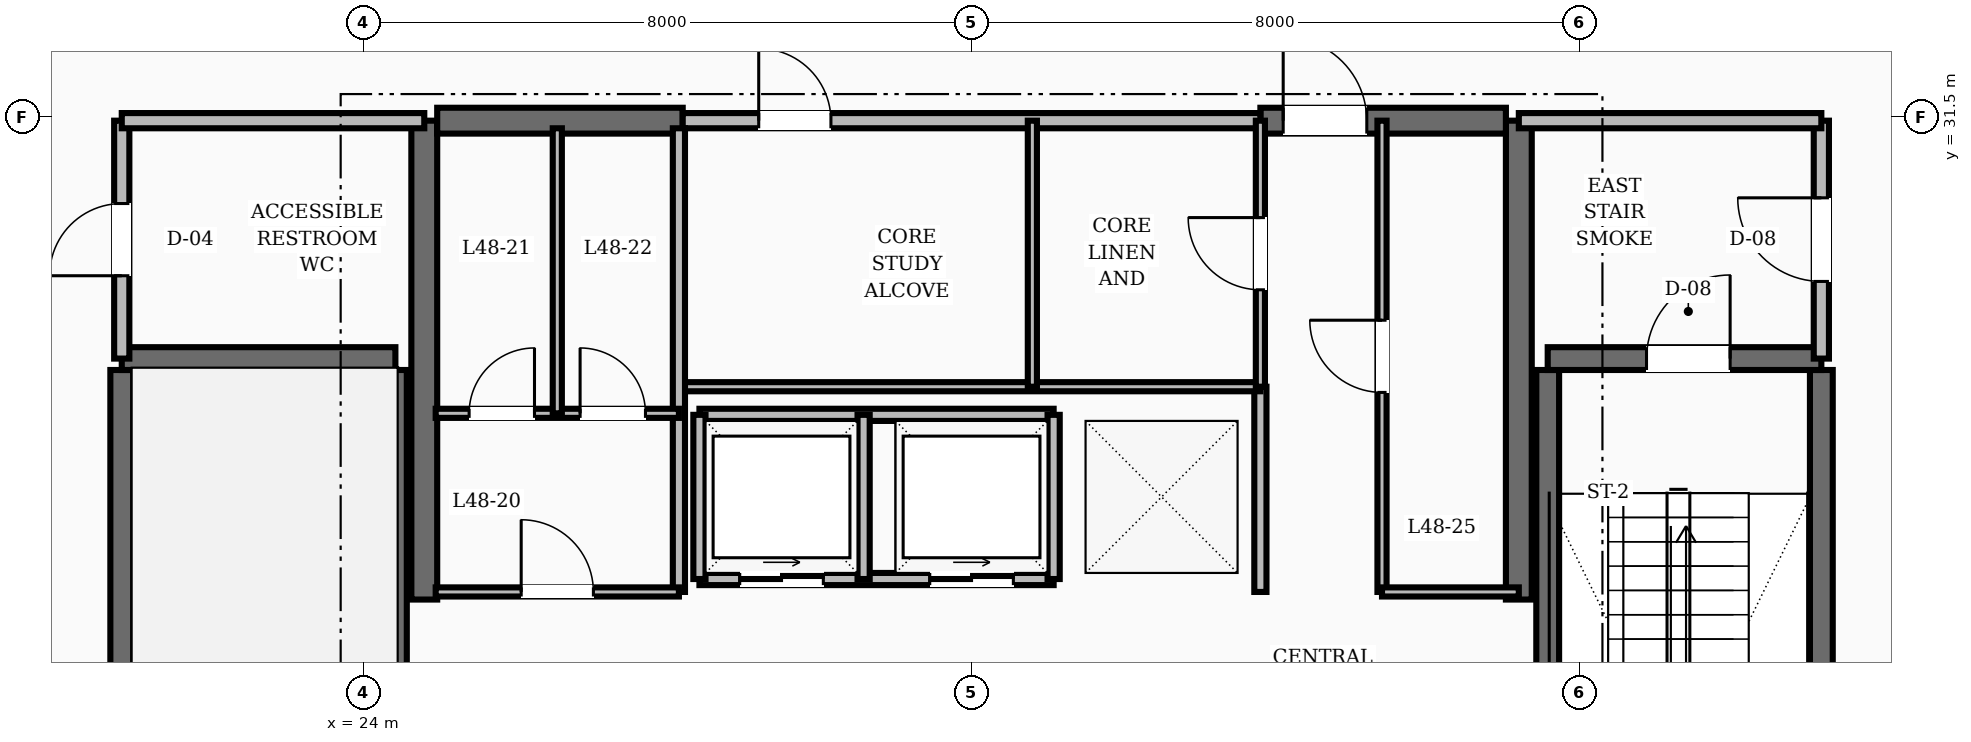
"""IFC4 building model, lengths in metres.
Left out: names, types, materials, properties, quantities, classifications, styles, units other than length and angle.
Written with IfcOpenShell. Run it as: python <this file> out.ifc"""

import sys

from ifc_helpers import new_model, si_unit, direction, frame, frame_2d, origin, place, context, subcontext, project, spatial, rectangle, extrude, element, fill, save


model = new_model("IFC4")
c1 = context("Model", 3, precision=1e-05, world=origin(), true_north=direction((0.0, 1.0)))
c2 = subcontext(c1, "Body", "Model", "MODEL_VIEW")
j1 = project(units=[si_unit("LENGTHUNIT", "METRE"), si_unit("PLANEANGLEUNIT", "RADIAN")], contexts=[c1])
p1 = place(None, origin())
s1 = spatial("IfcSite", under=j1, at=p1, CompositionType="ELEMENT")
p2 = place(p1, origin())
s2 = spatial("IfcBuilding", under=s1, at=p2, CompositionType="ELEMENT")
p3 = place(p2, frame((0.0, 0.0, 185.6)))
s3 = spatial("IfcBuildingStorey", under=s2, at=p3, CompositionType="ELEMENT", Elevation=185.6)
for number, where, z_axis, x_axis in (
    (1, (24.8, 25.15, 0.0), (0.0, 0.0, 1.0), (0.0, 1.0, 0.0)),
    (2, (39.2, 25.15, 0.0), (0.0, 0.0, 1.0), (0.0, 1.0, 0.0)),
):
    element("IfcWall", number, at=place(p3, frame(where, z_axis=z_axis, x_axis=x_axis)), inside=s3, PredefinedType="SHEAR", context=c2, shape_type="SweptSolid", body=[
        extrude(rectangle(XDim=6.3, YDim=0.34, at=frame_2d((3.15, 0.0))), origin(), (0.0, 0.0, 1.0), 3.6),
    ])
p4 = place(p3, frame((24.97, 31.45, 0.0), z_axis=(0.0, 0.0, 1.0), x_axis=(1.0, 0.0, 0.0)))
e3 = element("IfcWall", 3, at=p4, inside=s3, PredefinedType="SHEAR", context=c2, shape_type="SweptSolid", body=[
    extrude(rectangle(XDim=3.23, YDim=0.34, at=frame_2d((1.615, 0.0))), origin(), (0.0, 0.0, 1.0), 3.6),
])
p5 = place(p3, frame((35.8, 31.45, 0.0), z_axis=(0.0, 0.0, 1.0), x_axis=(1.0, 0.0, 0.0)))
e4 = element("IfcWall", 4, at=p5, inside=s3, PredefinedType="SHEAR", context=c2, shape_type="SweptSolid", body=[
    extrude(rectangle(XDim=3.23, YDim=0.34, at=frame_2d((1.615, 0.0))), origin(), (0.0, 0.0, 1.0), 3.6),
])
p6 = place(p5, frame((0.3, 0.0, 0.0)))
e5 = element("IfcOpeningElement", 5, at=p6, cuts=e4, PredefinedType="OPENING", context=c2, shape_type="SweptSolid", body=[
    extrude(rectangle(XDim=1.1, YDim=2.1, at=frame_2d((0.55, 1.05))), frame((0.0, 0.18, 0.0), z_axis=(0.0, -1.0, 0.0), x_axis=(1.0, 0.0, 0.0)), (0.0, 0.0, 1.0), 0.36),
])
for number, where, z_axis, x_axis in (
    (6, (20.82, 19.43, 0.0), (0.0, 0.0, 1.0), (0.0, 1.0, 0.0)),
    (7, (24.42, 19.43, 0.0), (0.0, 0.0, 1.0), (0.0, 1.0, 0.0)),
):
    element("IfcWall", number, at=place(p3, frame(where, z_axis=z_axis, x_axis=x_axis)), inside=s3, PredefinedType="SHEAR", context=c2, shape_type="SweptSolid", body=[
        extrude(rectangle(XDim=8.74, YDim=0.3, at=frame_2d((4.37, 0.0))), origin(), (0.0, 0.0, 1.0), 3.6),
    ])
p7 = place(p3, frame((20.82, 28.32, 0.0), z_axis=(0.0, 0.0, 1.0), x_axis=(1.0, 0.0, 0.0)))
e8 = element("IfcWall", 8, at=p7, inside=s3, PredefinedType="SHEAR", context=c2, shape_type="SweptSolid", body=[
    extrude(rectangle(XDim=3.6, YDim=0.3, at=frame_2d((1.8, 0.0))), origin(), (0.0, 0.0, 1.0), 3.6),
])
for number, where, z_axis, x_axis in (
    (9, (43.18, 19.43, 0.0), (0.0, 0.0, 1.0), (0.0, 1.0, 0.0)),
    (10, (39.58, 19.43, 0.0), (0.0, 0.0, 1.0), (0.0, 1.0, 0.0)),
):
    element("IfcWall", number, at=place(p3, frame(where, z_axis=z_axis, x_axis=x_axis)), inside=s3, PredefinedType="SHEAR", context=c2, shape_type="SweptSolid", body=[
        extrude(rectangle(XDim=8.74, YDim=0.3, at=frame_2d((4.37, 0.0))), origin(), (0.0, 0.0, 1.0), 3.6),
    ])
p8 = place(p3, frame((39.58, 28.32, 0.0), z_axis=(0.0, 0.0, 1.0), x_axis=(1.0, 0.0, 0.0)))
e11 = element("IfcWall", 11, at=p8, inside=s3, PredefinedType="SHEAR", context=c2, shape_type="SweptSolid", body=[
    extrude(rectangle(XDim=3.6, YDim=0.3, at=frame_2d((1.8, 0.0))), origin(), (0.0, 0.0, 1.0), 3.6),
])
p9 = place(p8, frame((1.3, 0.0, 0.0)))
e12 = element("IfcOpeningElement", 12, at=p9, cuts=e11, PredefinedType="OPENING", context=c2, shape_type="SweptSolid", body=[
    extrude(rectangle(XDim=1.1, YDim=2.1, at=frame_2d((0.55, 1.05))), frame((0.0, 0.16, 0.0), z_axis=(0.0, -1.0, 0.0), x_axis=(1.0, 0.0, 0.0)), (0.0, 0.0, 1.0), 0.32),
])
p10 = place(p3, frame((43.18, 28.32, 0.0), z_axis=(0.0, 0.0, 1.0), x_axis=(0.0, 1.0, 0.0)))
e13 = element("IfcWall", 13, at=p10, inside=s3, PredefinedType="SOLIDWALL", context=c2, shape_type="SweptSolid", body=[
    extrude(rectangle(XDim=3.13, YDim=0.2, at=frame_2d((1.565, 0.0))), origin(), (0.0, 0.0, 1.0), 2.8),
])
p11 = place(p10, frame((1.015, 0.0, 0.0)))
e14 = element("IfcOpeningElement", 14, at=p11, cuts=e13, PredefinedType="OPENING", context=c2, shape_type="SweptSolid", body=[
    extrude(rectangle(XDim=1.1, YDim=2.1, at=frame_2d((0.55, 1.05))), frame((0.0, 0.11, 0.0), z_axis=(0.0, -1.0, 0.0), x_axis=(1.0, 0.0, 0.0)), (0.0, 0.0, 1.0), 0.22),
])
p12 = place(p3, frame((39.2, 31.45, 0.0), z_axis=(0.0, 0.0, 1.0), x_axis=(1.0, 0.0, 0.0)))
e15 = element("IfcWall", 15, at=p12, inside=s3, PredefinedType="SOLIDWALL", context=c2, shape_type="SweptSolid", body=[
    extrude(rectangle(XDim=3.98, YDim=0.2, at=frame_2d((1.99, 0.0))), origin(), (0.0, 0.0, 1.0), 2.8),
])
p13 = place(p3, frame((20.82, 28.32, 0.0), z_axis=(0.0, 0.0, 1.0), x_axis=(0.0, 1.0, 0.0)))
e16 = element("IfcWall", 16, at=p13, inside=s3, PredefinedType="SOLIDWALL", context=c2, shape_type="SweptSolid", body=[
    extrude(rectangle(XDim=3.13, YDim=0.2, at=frame_2d((1.565, 0.0))), origin(), (0.0, 0.0, 1.0), 2.8),
])
p14 = place(p13, frame((1.09, 0.0, 0.0)))
e17 = element("IfcOpeningElement", 17, at=p14, cuts=e16, PredefinedType="OPENING", context=c2, shape_type="SweptSolid", body=[
    extrude(rectangle(XDim=0.95, YDim=2.1, at=frame_2d((0.475, 1.05))), frame((0.0, 0.11, 0.0), z_axis=(0.0, -1.0, 0.0), x_axis=(1.0, 0.0, 0.0)), (0.0, 0.0, 1.0), 0.22),
])
p15 = place(p3, frame((20.82, 31.45, 0.0), z_axis=(0.0, 0.0, 1.0), x_axis=(1.0, 0.0, 0.0)))
e18 = element("IfcWall", 18, at=p15, inside=s3, PredefinedType="SOLIDWALL", context=c2, shape_type="SweptSolid", body=[
    extrude(rectangle(XDim=3.98, YDim=0.2, at=frame_2d((1.99, 0.0))), origin(), (0.0, 0.0, 1.0), 2.8),
])
p16 = place(p3, frame((35.8, 25.25, 0.0), z_axis=(0.0, 0.0, 1.0), x_axis=(0.0, 1.0, 0.0)))
e19 = element("IfcWall", 19, at=p16, inside=s3, PredefinedType="SOLIDWALL", context=c2, shape_type="SweptSolid", body=[
    extrude(rectangle(XDim=2.7, YDim=0.16, at=frame_2d((1.35, 0.0))), origin(), (0.0, 0.0, 1.0), 2.8),
])
p17 = place(p3, frame((28.42, 25.42, 0.0), z_axis=(0.0, 0.0, 1.0), x_axis=(1.0, 0.0, 0.0)))
e20 = element("IfcWall", 20, at=p17, inside=s3, PredefinedType="SOLIDWALL", context=c2, shape_type="SweptSolid", body=[
    extrude(rectangle(XDim=4.66, YDim=0.16, at=frame_2d((2.33, 0.0))), origin(), (0.0, 0.0, 1.0), 2.8),
])
p18 = place(p17, frame((0.53, 0.0, 0.0)))
e21 = element("IfcOpeningElement", 21, at=p18, cuts=e20, PredefinedType="OPENING", context=c2, shape_type="SweptSolid", body=[
    extrude(rectangle(XDim=1.1, YDim=2.15, at=frame_2d((0.55, 1.075))), frame((0.0, 0.09, 0.0), z_axis=(0.0, -1.0, 0.0), x_axis=(1.0, 0.0, 0.0)), (0.0, 0.0, 1.0), 0.18),
])
p19 = place(p17, frame((3.03, 0.0, 0.0)))
e22 = element("IfcOpeningElement", 22, at=p19, cuts=e20, PredefinedType="OPENING", context=c2, shape_type="SweptSolid", body=[
    extrude(rectangle(XDim=1.1, YDim=2.15, at=frame_2d((0.55, 1.075))), frame((0.0, 0.09, 0.0), z_axis=(0.0, -1.0, 0.0), x_axis=(1.0, 0.0, 0.0)), (0.0, 0.0, 1.0), 0.18),
])
p20 = place(p3, frame((28.42, 27.58, 0.0), z_axis=(0.0, 0.0, 1.0), x_axis=(1.0, 0.0, 0.0)))
e23 = element("IfcWall", 23, at=p20, inside=s3, PredefinedType="SOLIDWALL", context=c2, shape_type="SweptSolid", body=[
    extrude(rectangle(XDim=4.66, YDim=0.16, at=frame_2d((2.33, 0.0))), origin(), (0.0, 0.0, 1.0), 2.8),
])
for number, where, z_axis, x_axis in (
    (24, (28.42, 25.42, 0.0), (0.0, 0.0, 1.0), (0.0, 1.0, 0.0)),
    (25, (30.58, 25.42, 0.0), (0.0, 0.0, 1.0), (0.0, 1.0, 0.0)),
    (26, (33.08, 25.42, 0.0), (0.0, 0.0, 1.0), (0.0, 1.0, 0.0)),
):
    element("IfcWall", number, at=place(p3, frame(where, z_axis=z_axis, x_axis=x_axis)), inside=s3, PredefinedType="SOLIDWALL", context=c2, shape_type="SweptSolid", body=[
        extrude(rectangle(XDim=2.16, YDim=0.16, at=frame_2d((1.08, 0.0))), origin(), (0.0, 0.0, 1.0), 2.8),
    ])
p21 = place(p3, frame((28.2, 31.45, 0.0), z_axis=(0.0, 0.0, 1.0), x_axis=(1.0, 0.0, 0.0)))
e27 = element("IfcWall", 27, at=p21, inside=s3, PredefinedType="SOLIDWALL", context=c2, shape_type="SweptSolid", body=[
    extrude(rectangle(XDim=7.6, YDim=0.2, at=frame_2d((3.8, 0.0))), origin(), (0.0, 0.0, 1.0), 2.8),
])
p22 = place(p21, frame((1.0, 0.0, 0.0)))
e28 = element("IfcOpeningElement", 28, at=p22, cuts=e27, PredefinedType="OPENING", context=c2, shape_type="SweptSolid", body=[
    extrude(rectangle(XDim=0.95, YDim=2.1, at=frame_2d((0.475, 1.05))), frame((0.0, 0.11, 0.0), z_axis=(0.0, -1.0, 0.0), x_axis=(1.0, 0.0, 0.0)), (0.0, 0.0, 1.0), 0.22),
])
p23 = place(p3, frame((28.2, 27.95, 0.0), z_axis=(0.0, 0.0, 1.0), x_axis=(1.0, 0.0, 0.0)))
e29 = element("IfcWall", 29, at=p23, inside=s3, PredefinedType="PARTITIONING", context=c2, shape_type="SweptSolid", body=[
    extrude(rectangle(XDim=7.6, YDim=0.12, at=frame_2d((3.8, 0.0))), origin(), (0.0, 0.0, 1.0), 2.8),
])
p24 = place(p3, frame((35.8, 27.95, 0.0), z_axis=(0.0, 0.0, 1.0), x_axis=(0.0, 1.0, 0.0)))
e30 = element("IfcWall", 30, at=p24, inside=s3, PredefinedType="PARTITIONING", context=c2, shape_type="SweptSolid", body=[
    extrude(rectangle(XDim=3.5, YDim=0.12, at=frame_2d((1.75, 0.0))), origin(), (0.0, 0.0, 1.0), 2.8),
])
p25 = place(p24, frame((1.275, 0.0, 0.0)))
e31 = element("IfcOpeningElement", 31, at=p25, cuts=e30, PredefinedType="OPENING", context=c2, shape_type="SweptSolid", body=[
    extrude(rectangle(XDim=0.95, YDim=2.1, at=frame_2d((0.475, 1.05))), frame((0.0, 0.07, 0.0), z_axis=(0.0, -1.0, 0.0), x_axis=(1.0, 0.0, 0.0)), (0.0, 0.0, 1.0), 0.14),
])
p26 = place(p3, frame((32.8, 27.95, 0.0), z_axis=(0.0, 0.0, 1.0), x_axis=(0.0, 1.0, 0.0)))
e32 = element("IfcWall", 32, at=p26, inside=s3, PredefinedType="PARTITIONING", context=c2, shape_type="SweptSolid", body=[
    extrude(rectangle(XDim=3.5, YDim=0.12, at=frame_2d((1.75, 0.0))), origin(), (0.0, 0.0, 1.0), 2.8),
])
p27 = place(p3, frame((28.15, 25.25, 0.0), z_axis=(0.0, 0.0, 1.0), x_axis=(0.0, 1.0, 0.0)))
e33 = element("IfcWall", 33, at=p27, inside=s3, PredefinedType="SOLIDWALL", context=c2, shape_type="SweptSolid", body=[
    extrude(rectangle(XDim=6.1, YDim=0.16, at=frame_2d((3.05, 0.0))), origin(), (0.0, 0.0, 1.0), 2.8),
])
p28 = place(p3, frame((24.95, 25.25, 0.0), z_axis=(0.0, 0.0, 1.0), x_axis=(1.0, 0.0, 0.0)))
e34 = element("IfcWall", 34, at=p28, inside=s3, PredefinedType="PARTITIONING", context=c2, shape_type="SweptSolid", body=[
    extrude(rectangle(XDim=3.2, YDim=0.12, at=frame_2d((1.6, 0.0))), origin(), (0.0, 0.0, 1.0), 2.8),
])
p29 = place(p28, frame((1.125, 0.0, 0.0)))
e35 = element("IfcOpeningElement", 35, at=p29, cuts=e34, PredefinedType="OPENING", context=c2, shape_type="SweptSolid", body=[
    extrude(rectangle(XDim=0.95, YDim=2.1, at=frame_2d((0.475, 1.05))), frame((0.0, 0.07, 0.0), z_axis=(0.0, -1.0, 0.0), x_axis=(1.0, 0.0, 0.0)), (0.0, 0.0, 1.0), 0.14),
])
p30 = place(p3, frame((37.4, 25.25, 0.0), z_axis=(0.0, 0.0, 1.0), x_axis=(0.0, 1.0, 0.0)))
e36 = element("IfcWall", 36, at=p30, inside=s3, PredefinedType="PARTITIONING", context=c2, shape_type="SweptSolid", body=[
    extrude(rectangle(XDim=6.2, YDim=0.12, at=frame_2d((3.1, 0.0))), origin(), (0.0, 0.0, 1.0), 2.8),
])
p31 = place(p30, frame((2.625, 0.0, 0.0)))
e37 = element("IfcOpeningElement", 37, at=p31, cuts=e36, PredefinedType="OPENING", context=c2, shape_type="SweptSolid", body=[
    extrude(rectangle(XDim=0.95, YDim=2.1, at=frame_2d((0.475, 1.05))), frame((0.0, 0.07, 0.0), z_axis=(0.0, -1.0, 0.0), x_axis=(1.0, 0.0, 0.0)), (0.0, 0.0, 1.0), 0.14),
])
p32 = place(p3, frame((37.4, 25.25, 0.0), z_axis=(0.0, 0.0, 1.0), x_axis=(1.0, 0.0, 0.0)))
e38 = element("IfcWall", 38, at=p32, inside=s3, PredefinedType="PARTITIONING", context=c2, shape_type="SweptSolid", body=[
    extrude(rectangle(XDim=1.8, YDim=0.12, at=frame_2d((0.9, 0.0))), origin(), (0.0, 0.0, 1.0), 2.8),
])
p33 = place(p3, frame((24.95, 27.6, 0.0), z_axis=(0.0, 0.0, 1.0), x_axis=(1.0, 0.0, 0.0)))
e39 = element("IfcWall", 39, at=p33, inside=s3, PredefinedType="PARTITIONING", context=c2, shape_type="SweptSolid", body=[
    extrude(rectangle(XDim=3.2, YDim=0.12, at=frame_2d((1.6, 0.0))), origin(), (0.0, 0.0, 1.0), 2.8),
])
p34 = place(p33, frame((0.44, 0.0, 0.0)))
e40 = element("IfcOpeningElement", 40, at=p34, cuts=e39, PredefinedType="OPENING", context=c2, shape_type="SweptSolid", body=[
    extrude(rectangle(XDim=0.86, YDim=2.1, at=frame_2d((0.43, 1.05))), frame((0.0, 0.07, 0.0), z_axis=(0.0, -1.0, 0.0), x_axis=(1.0, 0.0, 0.0)), (0.0, 0.0, 1.0), 0.14),
])
p35 = place(p33, frame((1.9, 0.0, 0.0)))
e41 = element("IfcOpeningElement", 41, at=p35, cuts=e39, PredefinedType="OPENING", context=c2, shape_type="SweptSolid", body=[
    extrude(rectangle(XDim=0.86, YDim=2.1, at=frame_2d((0.43, 1.05))), frame((0.0, 0.07, 0.0), z_axis=(0.0, -1.0, 0.0), x_axis=(1.0, 0.0, 0.0)), (0.0, 0.0, 1.0), 0.14),
])
p36 = place(p3, frame((26.55, 27.6, 0.0), z_axis=(0.0, 0.0, 1.0), x_axis=(0.0, 1.0, 0.0)))
e42 = element("IfcWall", 42, at=p36, inside=s3, PredefinedType="PARTITIONING", context=c2, shape_type="SweptSolid", body=[
    extrude(rectangle(XDim=3.75, YDim=0.12, at=frame_2d((1.875, 0.0))), origin(), (0.0, 0.0, 1.0), 2.8),
])
p37 = place(p9, origin())
e43 = element("IfcDoor", 43, at=p37, inside=s3, OperationType="SINGLE_SWING_RIGHT", PredefinedType="DOOR", context=c2, shape_type="SweptSolid", body=[
    extrude(rectangle(XDim=1.1, YDim=2.1, at=frame_2d((0.55, 1.05))), frame((0.0, 0.025, 0.0), z_axis=(0.0, -1.0, 0.0), x_axis=(1.0, 0.0, 0.0)), (0.0, 0.0, 1.0), 0.05),
])
fill(e12, e43)
p38 = place(p11, origin())
e44 = element("IfcDoor", 44, at=p38, inside=s3, OperationType="SINGLE_SWING_RIGHT", PredefinedType="DOOR", context=c2, shape_type="SweptSolid", body=[
    extrude(rectangle(XDim=1.1, YDim=2.1, at=frame_2d((0.55, 1.05))), frame((0.0, 0.025, 0.0), z_axis=(0.0, -1.0, 0.0), x_axis=(1.0, 0.0, 0.0)), (0.0, 0.0, 1.0), 0.05),
])
fill(e14, e44)
p39 = place(p14, origin())
e45 = element("IfcDoor", 45, at=p39, inside=s3, OperationType="SINGLE_SWING_LEFT", PredefinedType="DOOR", context=c2, shape_type="SweptSolid", body=[
    extrude(rectangle(XDim=0.95, YDim=2.1, at=frame_2d((0.475, 1.05))), frame((0.0, 0.025, 0.0), z_axis=(0.0, -1.0, 0.0), x_axis=(1.0, 0.0, 0.0)), (0.0, 0.0, 1.0), 0.05),
])
fill(e17, e45)
p40 = place(p6, origin())
e46 = element("IfcDoor", 46, at=p40, inside=s3, OperationType="SINGLE_SWING_LEFT", PredefinedType="DOOR", context=c2, shape_type="SweptSolid", body=[
    extrude(rectangle(XDim=1.1, YDim=2.1, at=frame_2d((0.55, 1.05))), frame((0.0, 0.025, 0.0), z_axis=(0.0, -1.0, 0.0), x_axis=(1.0, 0.0, 0.0)), (0.0, 0.0, 1.0), 0.05),
])
fill(e5, e46)
p41 = place(p18, origin())
e47 = element("IfcDoor", 47, at=p41, inside=s3, OperationType="SLIDING_TO_RIGHT", PredefinedType="DOOR", context=c2, shape_type="SweptSolid", body=[
    extrude(rectangle(XDim=1.1, YDim=2.15, at=frame_2d((0.55, 1.075))), frame((0.0, 0.025, 0.0), z_axis=(0.0, -1.0, 0.0), x_axis=(1.0, 0.0, 0.0)), (0.0, 0.0, 1.0), 0.05),
])
fill(e21, e47)
p42 = place(p19, origin())
e48 = element("IfcDoor", 48, at=p42, inside=s3, OperationType="SLIDING_TO_RIGHT", PredefinedType="DOOR", context=c2, shape_type="SweptSolid", body=[
    extrude(rectangle(XDim=1.1, YDim=2.15, at=frame_2d((0.55, 1.075))), frame((0.0, 0.025, 0.0), z_axis=(0.0, -1.0, 0.0), x_axis=(1.0, 0.0, 0.0)), (0.0, 0.0, 1.0), 0.05),
])
fill(e22, e48)
p43 = place(p22, origin())
e49 = element("IfcDoor", 49, at=p43, inside=s3, OperationType="SINGLE_SWING_LEFT", PredefinedType="DOOR", context=c2, shape_type="SweptSolid", body=[
    extrude(rectangle(XDim=0.95, YDim=2.1, at=frame_2d((0.475, 1.05))), frame((0.0, 0.025, 0.0), z_axis=(0.0, -1.0, 0.0), x_axis=(1.0, 0.0, 0.0)), (0.0, 0.0, 1.0), 0.05),
])
fill(e28, e49)
p44 = place(p25, origin())
e50 = element("IfcDoor", 50, at=p44, inside=s3, OperationType="SINGLE_SWING_RIGHT", PredefinedType="DOOR", context=c2, shape_type="SweptSolid", body=[
    extrude(rectangle(XDim=0.95, YDim=2.1, at=frame_2d((0.475, 1.05))), frame((0.0, 0.025, 0.0), z_axis=(0.0, -1.0, 0.0), x_axis=(1.0, 0.0, 0.0)), (0.0, 0.0, 1.0), 0.05),
])
fill(e31, e50)
p45 = place(p29, origin())
e51 = element("IfcDoor", 51, at=p45, inside=s3, OperationType="SINGLE_SWING_LEFT", PredefinedType="DOOR", context=c2, shape_type="SweptSolid", body=[
    extrude(rectangle(XDim=0.95, YDim=2.1, at=frame_2d((0.475, 1.05))), frame((0.0, 0.025, 0.0), z_axis=(0.0, -1.0, 0.0), x_axis=(1.0, 0.0, 0.0)), (0.0, 0.0, 1.0), 0.05),
])
fill(e35, e51)
p46 = place(p34, origin())
e52 = element("IfcDoor", 52, at=p46, inside=s3, OperationType="SINGLE_SWING_RIGHT", PredefinedType="DOOR", context=c2, shape_type="SweptSolid", body=[
    extrude(rectangle(XDim=0.86, YDim=2.1, at=frame_2d((0.43, 1.05))), frame((0.0, 0.025, 0.0), z_axis=(0.0, -1.0, 0.0), x_axis=(1.0, 0.0, 0.0)), (0.0, 0.0, 1.0), 0.05),
])
fill(e40, e52)
p47 = place(p35, origin())
e53 = element("IfcDoor", 53, at=p47, inside=s3, OperationType="SINGLE_SWING_LEFT", PredefinedType="DOOR", context=c2, shape_type="SweptSolid", body=[
    extrude(rectangle(XDim=0.86, YDim=2.1, at=frame_2d((0.43, 1.05))), frame((0.0, 0.025, 0.0), z_axis=(0.0, -1.0, 0.0), x_axis=(1.0, 0.0, 0.0)), (0.0, 0.0, 1.0), 0.05),
])
fill(e41, e53)
p48 = place(p31, origin())
e54 = element("IfcDoor", 54, at=p48, inside=s3, OperationType="SINGLE_SWING_RIGHT", PredefinedType="DOOR", context=c2, shape_type="SweptSolid", body=[
    extrude(rectangle(XDim=0.95, YDim=2.1, at=frame_2d((0.475, 1.05))), frame((0.0, 0.025, 0.0), z_axis=(0.0, -1.0, 0.0), x_axis=(1.0, 0.0, 0.0)), (0.0, 0.0, 1.0), 0.05),
])
fill(e37, e54)
save(model, sys.argv[1])
